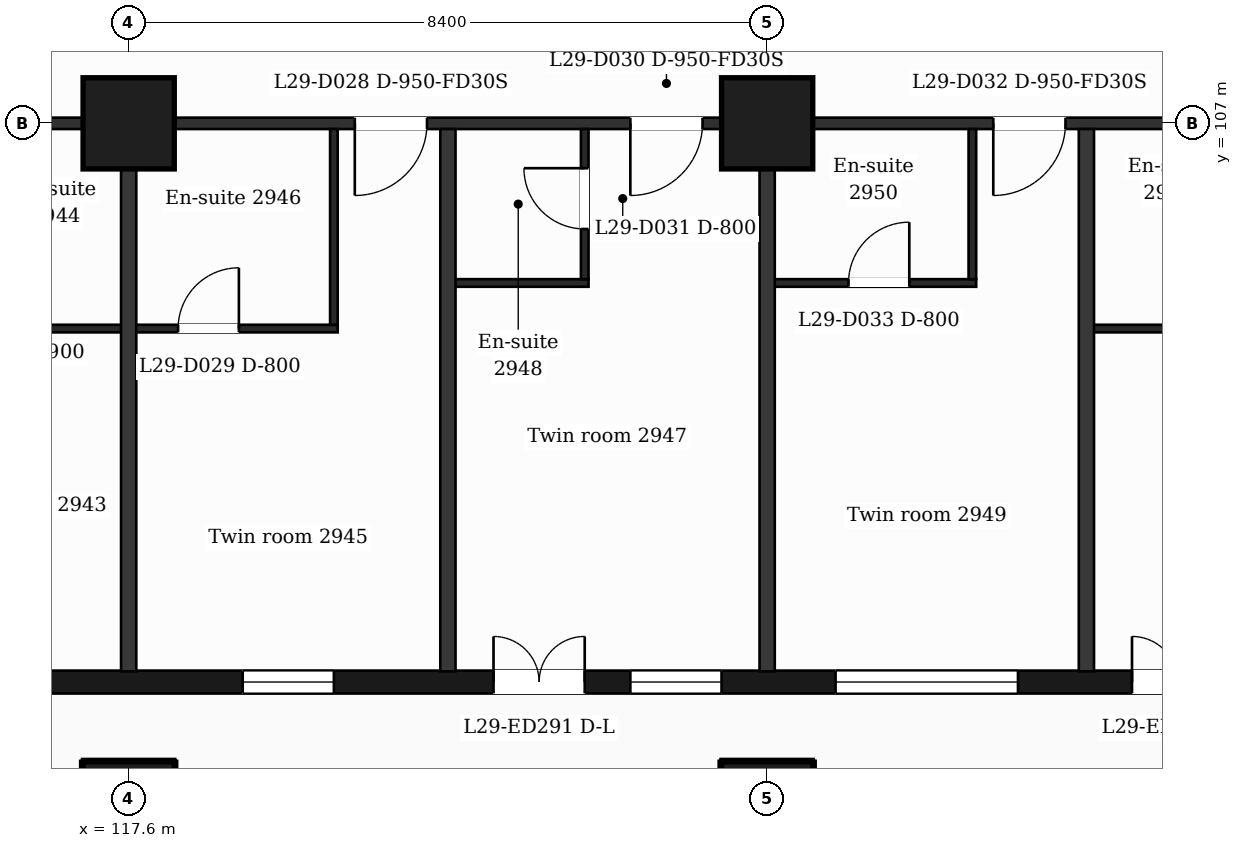
"""IFC4 building model, lengths in metres.
Left out: names, types, materials, properties, quantities, classifications, styles, units other than length and angle.
Written with IfcOpenShell. Run it as: python <this file> out.ifc"""

import sys

from ifc_helpers import new_model, si_unit, direction, frame, frame_2d, origin, origin_2d, place, context, subcontext, project, spatial, rectangle, extrude, element, fill, save


model = new_model("IFC4")
c1 = context("Model", 3, precision=1e-05, world=origin(), true_north=direction((0.0, 1.0)))
c2 = subcontext(c1, "Body", "Model", "MODEL_VIEW")
j1 = project(units=[si_unit("LENGTHUNIT", "METRE"), si_unit("PLANEANGLEUNIT", "RADIAN")], contexts=[c1])
p1 = place(None, origin())
s1 = spatial("IfcSite", under=j1, at=p1, CompositionType="ELEMENT")
p2 = place(p1, origin())
s2 = spatial("IfcBuilding", under=s1, at=p2, CompositionType="ELEMENT")
p3 = place(p2, frame((0.0, 0.0, 124.3)))
s3 = spatial("IfcBuildingStorey", under=s2, at=p3, CompositionType="ELEMENT", Elevation=124.3)
for number, where, z_axis, x_axis in (
    (1, (117.6, 98.0, 0.0), (0.0, 0.0, 1.0), (1.0, 0.0, 0.0)),
    (2, (126.0, 98.0, 0.0), (0.0, 0.0, 1.0), (1.0, 0.0, 0.0)),
    (3, (117.6, 107.0, 0.0), (0.0, 0.0, 1.0), (1.0, 0.0, 0.0)),
    (4, (126.0, 107.0, 0.0), (0.0, 0.0, 1.0), (1.0, 0.0, 0.0)),
):
    element("IfcColumn", number, at=place(p3, frame(where, z_axis=z_axis, x_axis=x_axis)), inside=s3, PredefinedType="COLUMN", context=c2, shape_type="SweptSolid", body=[
        extrude(rectangle(XDim=1.2, YDim=1.2, at=origin_2d()), origin(), (0.0, 0.0, 1.0), 3.7),
    ])
p4 = place(p3, frame((89.85, 99.65, 0.0), z_axis=(0.0, 0.0, 1.0), x_axis=(1.0, 0.0, 0.0)))
e5 = element("IfcWall", 5, at=p4, inside=s3, PredefinedType="SOLIDWALL", context=c2, shape_type="SweptSolid", body=[
    extrude(rectangle(XDim=47.25, YDim=0.3, at=frame_2d((23.625, 0.0))), origin(), (0.0, 0.0, 1.0), 3.38),
])
p5 = place(p4, frame((0.725, 0.0, 0.9)))
e6 = element("IfcOpeningElement", 6, at=p5, cuts=e5, PredefinedType="OPENING", context=c2, shape_type="SweptSolid", body=[
    extrude(rectangle(XDim=1.2, YDim=2.1, at=frame_2d((0.6, 1.05))), frame((0.0, 0.16, 0.0), z_axis=(0.0, -1.0, 0.0), x_axis=(1.0, 0.0, 0.0)), (0.0, 0.0, 1.0), 0.32),
])
p6 = place(p4, frame((3.45, 0.0, 0.9)))
e7 = element("IfcOpeningElement", 7, at=p6, cuts=e5, PredefinedType="OPENING", context=c2, shape_type="SweptSolid", body=[
    extrude(rectangle(XDim=2.4, YDim=2.1, at=frame_2d((1.2, 1.05))), frame((0.0, 0.16, 0.0), z_axis=(0.0, -1.0, 0.0), x_axis=(1.0, 0.0, 0.0)), (0.0, 0.0, 1.0), 0.32),
])
p7 = place(p4, frame((7.65, 0.0, 0.9)))
e8 = element("IfcOpeningElement", 8, at=p7, cuts=e5, PredefinedType="OPENING", context=c2, shape_type="SweptSolid", body=[
    extrude(rectangle(XDim=2.4, YDim=2.1, at=frame_2d((1.2, 1.05))), frame((0.0, 0.16, 0.0), z_axis=(0.0, -1.0, 0.0), x_axis=(1.0, 0.0, 0.0)), (0.0, 0.0, 1.0), 0.32),
])
p8 = place(p4, frame((11.85, 0.0, 0.9)))
e9 = element("IfcOpeningElement", 9, at=p8, cuts=e5, PredefinedType="OPENING", context=c2, shape_type="SweptSolid", body=[
    extrude(rectangle(XDim=2.4, YDim=2.1, at=frame_2d((1.2, 1.05))), frame((0.0, 0.16, 0.0), z_axis=(0.0, -1.0, 0.0), x_axis=(1.0, 0.0, 0.0)), (0.0, 0.0, 1.0), 0.32),
])
p9 = place(p4, frame((16.05, 0.0, 0.9)))
e10 = element("IfcOpeningElement", 10, at=p9, cuts=e5, PredefinedType="OPENING", context=c2, shape_type="SweptSolid", body=[
    extrude(rectangle(XDim=2.4, YDim=2.1, at=frame_2d((1.2, 1.05))), frame((0.0, 0.16, 0.0), z_axis=(0.0, -1.0, 0.0), x_axis=(1.0, 0.0, 0.0)), (0.0, 0.0, 1.0), 0.32),
])
p10 = place(p4, frame((20.25, 0.0, 0.9)))
e11 = element("IfcOpeningElement", 11, at=p10, cuts=e5, PredefinedType="OPENING", context=c2, shape_type="SweptSolid", body=[
    extrude(rectangle(XDim=2.4, YDim=2.1, at=frame_2d((1.2, 1.05))), frame((0.0, 0.16, 0.0), z_axis=(0.0, -1.0, 0.0), x_axis=(1.0, 0.0, 0.0)), (0.0, 0.0, 1.0), 0.32),
])
p11 = place(p4, frame((25.05, 0.0, 0.9)))
e12 = element("IfcOpeningElement", 12, at=p11, cuts=e5, PredefinedType="OPENING", context=c2, shape_type="SweptSolid", body=[
    extrude(rectangle(XDim=1.2, YDim=2.1, at=frame_2d((0.6, 1.05))), frame((0.0, 0.16, 0.0), z_axis=(0.0, -1.0, 0.0), x_axis=(1.0, 0.0, 0.0)), (0.0, 0.0, 1.0), 0.32),
])
p12 = place(p4, frame((29.25, 0.0, 0.9)))
e13 = element("IfcOpeningElement", 13, at=p12, cuts=e5, PredefinedType="OPENING", context=c2, shape_type="SweptSolid", body=[
    extrude(rectangle(XDim=1.2, YDim=2.1, at=frame_2d((0.6, 1.05))), frame((0.0, 0.16, 0.0), z_axis=(0.0, -1.0, 0.0), x_axis=(1.0, 0.0, 0.0)), (0.0, 0.0, 1.0), 0.32),
])
p13 = place(p4, frame((32.55, 0.0, 0.0)))
e14 = element("IfcOpeningElement", 14, at=p13, cuts=e5, PredefinedType="OPENING", context=c2, shape_type="SweptSolid", body=[
    extrude(rectangle(XDim=1.2, YDim=2.4, at=frame_2d((0.6, 1.2))), frame((0.0, 0.16, 0.0), z_axis=(0.0, -1.0, 0.0), x_axis=(1.0, 0.0, 0.0)), (0.0, 0.0, 1.0), 0.32),
])
p14 = place(p4, frame((34.35, 0.0, 0.9)))
e15 = element("IfcOpeningElement", 15, at=p14, cuts=e5, PredefinedType="OPENING", context=c2, shape_type="SweptSolid", body=[
    extrude(rectangle(XDim=1.2, YDim=2.1, at=frame_2d((0.6, 1.05))), frame((0.0, 0.16, 0.0), z_axis=(0.0, -1.0, 0.0), x_axis=(1.0, 0.0, 0.0)), (0.0, 0.0, 1.0), 0.32),
])
p15 = place(p4, frame((37.05, 0.0, 0.9)))
e16 = element("IfcOpeningElement", 16, at=p15, cuts=e5, PredefinedType="OPENING", context=c2, shape_type="SweptSolid", body=[
    extrude(rectangle(XDim=2.4, YDim=2.1, at=frame_2d((1.2, 1.05))), frame((0.0, 0.16, 0.0), z_axis=(0.0, -1.0, 0.0), x_axis=(1.0, 0.0, 0.0)), (0.0, 0.0, 1.0), 0.32),
])
p16 = place(p4, frame((40.95, 0.0, 0.0)))
e17 = element("IfcOpeningElement", 17, at=p16, cuts=e5, PredefinedType="OPENING", context=c2, shape_type="SweptSolid", body=[
    extrude(rectangle(XDim=1.2, YDim=2.4, at=frame_2d((0.6, 1.2))), frame((0.0, 0.16, 0.0), z_axis=(0.0, -1.0, 0.0), x_axis=(1.0, 0.0, 0.0)), (0.0, 0.0, 1.0), 0.32),
])
p17 = place(p4, frame((42.75, 0.0, 0.9)))
e18 = element("IfcOpeningElement", 18, at=p17, cuts=e5, PredefinedType="OPENING", context=c2, shape_type="SweptSolid", body=[
    extrude(rectangle(XDim=1.2, YDim=2.1, at=frame_2d((0.6, 1.05))), frame((0.0, 0.16, 0.0), z_axis=(0.0, -1.0, 0.0), x_axis=(1.0, 0.0, 0.0)), (0.0, 0.0, 1.0), 0.32),
])
p18 = place(p4, frame((45.25, 0.0, 0.9)))
e19 = element("IfcOpeningElement", 19, at=p18, cuts=e5, PredefinedType="OPENING", context=c2, shape_type="SweptSolid", body=[
    extrude(rectangle(XDim=1.2, YDim=2.1, at=frame_2d((0.6, 1.05))), frame((0.0, 0.16, 0.0), z_axis=(0.0, -1.0, 0.0), x_axis=(1.0, 0.0, 0.0)), (0.0, 0.0, 1.0), 0.32),
])
p19 = place(p3, frame((114.85, 104.3, 0.0), z_axis=(0.0, 0.0, 1.0), x_axis=(1.0, 0.0, 0.0)))
e20 = element("IfcWall", 20, at=p19, inside=s3, PredefinedType="PARTITIONING", context=c2, shape_type="SweptSolid", body=[
    extrude(rectangle(XDim=5.5, YDim=0.1, at=frame_2d((2.75, 0.0))), origin(), (0.0, 0.0, 1.0), 3.38),
])
p20 = place(p19, frame((3.4, 0.0, 0.0)))
e21 = element("IfcOpeningElement", 21, at=p20, cuts=e20, PredefinedType="OPENING", context=c2, shape_type="SweptSolid", body=[
    extrude(rectangle(XDim=0.8, YDim=2.1, at=frame_2d((0.4, 1.05))), frame((0.0, 0.06, 0.0), z_axis=(0.0, -1.0, 0.0), x_axis=(1.0, 0.0, 0.0)), (0.0, 0.0, 1.0), 0.12),
])
p21 = place(p3, frame((130.2, 104.3, 0.0), z_axis=(0.0, 0.0, 1.0), x_axis=(1.0, 0.0, 0.0)))
e22 = element("IfcWall", 22, at=p21, inside=s3, PredefinedType="PARTITIONING", context=c2, shape_type="SweptSolid", body=[
    extrude(rectangle(XDim=2.15, YDim=0.1, at=frame_2d((1.075, 0.0))), origin(), (0.0, 0.0, 1.0), 3.38),
])
p22 = place(p3, frame((121.8, 104.9, 0.0), z_axis=(0.0, 0.0, 1.0), x_axis=(1.0, 0.0, 0.0)))
e23 = element("IfcWall", 23, at=p22, inside=s3, PredefinedType="PARTITIONING", context=c2, shape_type="SweptSolid", body=[
    extrude(rectangle(XDim=1.85, YDim=0.1, at=frame_2d((0.925, 0.0))), origin(), (0.0, 0.0, 1.0), 3.38),
])
p23 = place(p3, frame((126.0, 104.9, 0.0), z_axis=(0.0, 0.0, 1.0), x_axis=(1.0, 0.0, 0.0)))
e24 = element("IfcWall", 24, at=p23, inside=s3, PredefinedType="PARTITIONING", context=c2, shape_type="SweptSolid", body=[
    extrude(rectangle(XDim=2.75, YDim=0.1, at=frame_2d((1.375, 0.0))), origin(), (0.0, 0.0, 1.0), 3.38),
])
p24 = place(p23, frame((1.07, 0.0, 0.0)))
e25 = element("IfcOpeningElement", 25, at=p24, cuts=e24, PredefinedType="OPENING", context=c2, shape_type="SweptSolid", body=[
    extrude(rectangle(XDim=0.8, YDim=2.1, at=frame_2d((0.4, 1.05))), frame((0.0, 0.06, 0.0), z_axis=(0.0, -1.0, 0.0), x_axis=(1.0, 0.0, 0.0)), (0.0, 0.0, 1.0), 0.12),
])
p25 = place(p3, frame((87.018, 107.0, 0.0), z_axis=(0.0, 0.0, 1.0), x_axis=(1.0, 0.0, 0.0)))
e26 = element("IfcWall", 26, at=p25, inside=s3, PredefinedType="PARTITIONING", context=c2, shape_type="SweptSolid", body=[
    extrude(rectangle(XDim=52.765, YDim=0.15, at=frame_2d((26.382, 0.0))), origin(), (0.0, 0.0, 1.0), 3.38),
])
p26 = place(p25, frame((1.276, 0.0, 0.0)))
e27 = element("IfcOpeningElement", 27, at=p26, cuts=e26, PredefinedType="OPENING", context=c2, shape_type="SweptSolid", body=[
    extrude(rectangle(XDim=0.95, YDim=2.1, at=frame_2d((0.475, 1.05))), frame((0.0, 0.085, 0.0), z_axis=(0.0, -1.0, 0.0), x_axis=(1.0, 0.0, 0.0)), (0.0, 0.0, 1.0), 0.17),
])
p27 = place(p25, frame((6.192, 0.0, 0.0)))
e28 = element("IfcOpeningElement", 28, at=p27, cuts=e26, PredefinedType="OPENING", context=c2, shape_type="SweptSolid", body=[
    extrude(rectangle(XDim=0.95, YDim=2.1, at=frame_2d((0.475, 1.05))), frame((0.0, 0.085, 0.0), z_axis=(0.0, -1.0, 0.0), x_axis=(1.0, 0.0, 0.0)), (0.0, 0.0, 1.0), 0.17),
])
p28 = place(p25, frame((11.982, 0.0, 0.0)))
e29 = element("IfcOpeningElement", 29, at=p28, cuts=e26, PredefinedType="OPENING", context=c2, shape_type="SweptSolid", body=[
    extrude(rectangle(XDim=1.0, YDim=2.1, at=frame_2d((0.5, 1.05))), frame((0.0, 0.085, 0.0), z_axis=(0.0, -1.0, 0.0), x_axis=(1.0, 0.0, 0.0)), (0.0, 0.0, 1.0), 0.17),
])
p29 = place(p25, frame((14.582, 0.0, 0.0)))
e30 = element("IfcOpeningElement", 30, at=p29, cuts=e26, PredefinedType="OPENING", context=c2, shape_type="SweptSolid", body=[
    extrude(rectangle(XDim=0.95, YDim=2.1, at=frame_2d((0.475, 1.05))), frame((0.0, 0.085, 0.0), z_axis=(0.0, -1.0, 0.0), x_axis=(1.0, 0.0, 0.0)), (0.0, 0.0, 1.0), 0.17),
])
p30 = place(p25, frame((18.257, 0.0, 0.0)))
e31 = element("IfcOpeningElement", 31, at=p30, cuts=e26, PredefinedType="OPENING", context=c2, shape_type="SweptSolid", body=[
    extrude(rectangle(XDim=0.95, YDim=2.1, at=frame_2d((0.475, 1.05))), frame((0.0, 0.085, 0.0), z_axis=(0.0, -1.0, 0.0), x_axis=(1.0, 0.0, 0.0)), (0.0, 0.0, 1.0), 0.17),
])
p31 = place(p25, frame((22.992, 0.0, 0.0)))
e32 = element("IfcOpeningElement", 32, at=p31, cuts=e26, PredefinedType="OPENING", context=c2, shape_type="SweptSolid", body=[
    extrude(rectangle(XDim=0.95, YDim=2.1, at=frame_2d((0.475, 1.05))), frame((0.0, 0.085, 0.0), z_axis=(0.0, -1.0, 0.0), x_axis=(1.0, 0.0, 0.0)), (0.0, 0.0, 1.0), 0.17),
])
p32 = place(p25, frame((26.632, 0.0, 0.0)))
e33 = element("IfcOpeningElement", 33, at=p32, cuts=e26, PredefinedType="OPENING", context=c2, shape_type="SweptSolid", body=[
    extrude(rectangle(XDim=1.0, YDim=2.1, at=frame_2d((0.5, 1.05))), frame((0.0, 0.085, 0.0), z_axis=(0.0, -1.0, 0.0), x_axis=(1.0, 0.0, 0.0)), (0.0, 0.0, 1.0), 0.17),
])
p33 = place(p25, frame((33.557, 0.0, 0.0)))
e34 = element("IfcOpeningElement", 34, at=p33, cuts=e26, PredefinedType="OPENING", context=c2, shape_type="SweptSolid", body=[
    extrude(rectangle(XDim=0.95, YDim=2.1, at=frame_2d((0.475, 1.05))), frame((0.0, 0.085, 0.0), z_axis=(0.0, -1.0, 0.0), x_axis=(1.0, 0.0, 0.0)), (0.0, 0.0, 1.0), 0.17),
])
p34 = place(p25, frame((37.182, 0.0, 0.0)))
e35 = element("IfcOpeningElement", 35, at=p34, cuts=e26, PredefinedType="OPENING", context=c2, shape_type="SweptSolid", body=[
    extrude(rectangle(XDim=0.95, YDim=2.1, at=frame_2d((0.475, 1.05))), frame((0.0, 0.085, 0.0), z_axis=(0.0, -1.0, 0.0), x_axis=(1.0, 0.0, 0.0)), (0.0, 0.0, 1.0), 0.17),
])
p35 = place(p25, frame((41.957, 0.0, 0.0)))
e36 = element("IfcOpeningElement", 36, at=p35, cuts=e26, PredefinedType="OPENING", context=c2, shape_type="SweptSolid", body=[
    extrude(rectangle(XDim=0.95, YDim=2.1, at=frame_2d((0.475, 1.05))), frame((0.0, 0.085, 0.0), z_axis=(0.0, -1.0, 0.0), x_axis=(1.0, 0.0, 0.0)), (0.0, 0.0, 1.0), 0.17),
])
p36 = place(p25, frame((45.622, 0.0, 0.0)))
e37 = element("IfcOpeningElement", 37, at=p36, cuts=e26, PredefinedType="OPENING", context=c2, shape_type="SweptSolid", body=[
    extrude(rectangle(XDim=0.95, YDim=2.1, at=frame_2d((0.475, 1.05))), frame((0.0, 0.085, 0.0), z_axis=(0.0, -1.0, 0.0), x_axis=(1.0, 0.0, 0.0)), (0.0, 0.0, 1.0), 0.17),
])
p37 = place(p25, frame((48.56, 0.0, 0.0)))
e38 = element("IfcOpeningElement", 38, at=p37, cuts=e26, PredefinedType="OPENING", context=c2, shape_type="SweptSolid", body=[
    extrude(rectangle(XDim=0.95, YDim=2.1, at=frame_2d((0.475, 1.05))), frame((0.0, 0.085, 0.0), z_axis=(0.0, -1.0, 0.0), x_axis=(1.0, 0.0, 0.0)), (0.0, 0.0, 1.0), 0.17),
])
p38 = place(p3, frame((117.6, 99.79, 0.0), z_axis=(0.0, 0.0, 1.0), x_axis=(0.0, 1.0, 0.0)))
e39 = element("IfcWall", 39, at=p38, inside=s3, PredefinedType="PARTITIONING", context=c2, shape_type="SweptSolid", body=[
    extrude(rectangle(XDim=7.135, YDim=0.2, at=frame_2d((3.567, 0.0))), origin(), (0.0, 0.0, 1.0), 3.38),
])
p39 = place(p3, frame((120.3, 104.35, 0.0), z_axis=(0.0, 0.0, 1.0), x_axis=(0.0, 1.0, 0.0)))
e40 = element("IfcWall", 40, at=p39, inside=s3, PredefinedType="PARTITIONING", context=c2, shape_type="SweptSolid", body=[
    extrude(rectangle(XDim=2.575, YDim=0.1, at=frame_2d((1.288, 0.0))), origin(), (0.0, 0.0, 1.0), 3.38),
])
p40 = place(p3, frame((121.8, 99.79, 0.0), z_axis=(0.0, 0.0, 1.0), x_axis=(0.0, 1.0, 0.0)))
e41 = element("IfcWall", 41, at=p40, inside=s3, PredefinedType="PARTITIONING", context=c2, shape_type="SweptSolid", body=[
    extrude(rectangle(XDim=7.135, YDim=0.2, at=frame_2d((3.567, 0.0))), origin(), (0.0, 0.0, 1.0), 3.38),
])
p41 = place(p3, frame((123.6, 104.95, 0.0), z_axis=(0.0, 0.0, 1.0), x_axis=(0.0, 1.0, 0.0)))
e42 = element("IfcWall", 42, at=p41, inside=s3, PredefinedType="PARTITIONING", context=c2, shape_type="SweptSolid", body=[
    extrude(rectangle(XDim=1.975, YDim=0.1, at=frame_2d((0.988, 0.0))), origin(), (0.0, 0.0, 1.0), 3.38),
])
p42 = place(p41, frame((0.66, 0.0, 0.0)))
e43 = element("IfcOpeningElement", 43, at=p42, cuts=e42, PredefinedType="OPENING", context=c2, shape_type="SweptSolid", body=[
    extrude(rectangle(XDim=0.8, YDim=2.1, at=frame_2d((0.4, 1.05))), frame((0.0, 0.06, 0.0), z_axis=(0.0, -1.0, 0.0), x_axis=(1.0, 0.0, 0.0)), (0.0, 0.0, 1.0), 0.12),
])
p43 = place(p3, frame((126.0, 99.79, 0.0), z_axis=(0.0, 0.0, 1.0), x_axis=(0.0, 1.0, 0.0)))
e44 = element("IfcWall", 44, at=p43, inside=s3, PredefinedType="PARTITIONING", context=c2, shape_type="SweptSolid", body=[
    extrude(rectangle(XDim=7.135, YDim=0.2, at=frame_2d((3.567, 0.0))), origin(), (0.0, 0.0, 1.0), 3.38),
])
p44 = place(p3, frame((128.7, 104.95, 0.0), z_axis=(0.0, 0.0, 1.0), x_axis=(0.0, 1.0, 0.0)))
e45 = element("IfcWall", 45, at=p44, inside=s3, PredefinedType="PARTITIONING", context=c2, shape_type="SweptSolid", body=[
    extrude(rectangle(XDim=1.975, YDim=0.1, at=frame_2d((0.988, 0.0))), origin(), (0.0, 0.0, 1.0), 3.38),
])
p45 = place(p3, frame((130.2, 99.79, 0.0), z_axis=(0.0, 0.0, 1.0), x_axis=(0.0, 1.0, 0.0)))
e46 = element("IfcWall", 46, at=p45, inside=s3, PredefinedType="PARTITIONING", context=c2, shape_type="SweptSolid", body=[
    extrude(rectangle(XDim=7.135, YDim=0.2, at=frame_2d((3.567, 0.0))), origin(), (0.0, 0.0, 1.0), 3.38),
])
p46 = place(p12, origin())
e47 = element("IfcWindow", 47, at=p46, inside=s3, PartitioningType="SINGLE_PANEL", PredefinedType="WINDOW", context=c2, shape_type="SweptSolid", body=[
    extrude(rectangle(XDim=1.2, YDim=2.1, at=frame_2d((0.6, 1.05))), frame((0.0, 0.03, 0.0), z_axis=(0.0, -1.0, 0.0), x_axis=(1.0, 0.0, 0.0)), (0.0, 0.0, 1.0), 0.06),
])
fill(e13, e47)
p47 = place(p13, origin())
e48 = element("IfcDoor", 48, at=p47, inside=s3, OperationType="DOUBLE_DOOR_SINGLE_SWING", PredefinedType="DOOR", context=c2, shape_type="SweptSolid", body=[
    extrude(rectangle(XDim=1.2, YDim=2.4, at=frame_2d((0.6, 1.2))), frame((0.0, 0.025, 0.0), z_axis=(0.0, -1.0, 0.0), x_axis=(1.0, 0.0, 0.0)), (0.0, 0.0, 1.0), 0.05),
])
fill(e14, e48)
p48 = place(p14, origin())
e49 = element("IfcWindow", 49, at=p48, inside=s3, PartitioningType="SINGLE_PANEL", PredefinedType="WINDOW", context=c2, shape_type="SweptSolid", body=[
    extrude(rectangle(XDim=1.2, YDim=2.1, at=frame_2d((0.6, 1.05))), frame((0.0, 0.03, 0.0), z_axis=(0.0, -1.0, 0.0), x_axis=(1.0, 0.0, 0.0)), (0.0, 0.0, 1.0), 0.06),
])
fill(e15, e49)
p49 = place(p15, origin())
e50 = element("IfcWindow", 50, at=p49, inside=s3, PartitioningType="SINGLE_PANEL", PredefinedType="WINDOW", context=c2, shape_type="SweptSolid", body=[
    extrude(rectangle(XDim=2.4, YDim=2.1, at=frame_2d((1.2, 1.05))), frame((0.0, 0.03, 0.0), z_axis=(0.0, -1.0, 0.0), x_axis=(1.0, 0.0, 0.0)), (0.0, 0.0, 1.0), 0.06),
])
fill(e16, e50)
p50 = place(p16, origin())
e51 = element("IfcDoor", 51, at=p50, inside=s3, OperationType="DOUBLE_DOOR_SINGLE_SWING", PredefinedType="DOOR", context=c2, shape_type="SweptSolid", body=[
    extrude(rectangle(XDim=1.2, YDim=2.4, at=frame_2d((0.6, 1.2))), frame((0.0, 0.025, 0.0), z_axis=(0.0, -1.0, 0.0), x_axis=(1.0, 0.0, 0.0)), (0.0, 0.0, 1.0), 0.05),
])
fill(e17, e51)
p51 = place(p33, origin())
e52 = element("IfcDoor", 52, at=p51, inside=s3, OperationType="SINGLE_SWING_LEFT", PredefinedType="DOOR", context=c2, shape_type="SweptSolid", body=[
    extrude(rectangle(XDim=0.95, YDim=2.1, at=frame_2d((0.475, 1.05))), frame((0.0, 0.025, 0.0), z_axis=(0.0, -1.0, 0.0), x_axis=(1.0, 0.0, 0.0)), (0.0, 0.0, 1.0), 0.05),
])
fill(e34, e52)
p52 = place(p20, origin())
e53 = element("IfcDoor", 53, at=p52, inside=s3, OperationType="SINGLE_SWING_RIGHT", PredefinedType="DOOR", context=c2, shape_type="SweptSolid", body=[
    extrude(rectangle(XDim=0.8, YDim=2.1, at=frame_2d((0.4, 1.05))), frame((0.0, 0.025, 0.0), z_axis=(0.0, -1.0, 0.0), x_axis=(1.0, 0.0, 0.0)), (0.0, 0.0, 1.0), 0.05),
])
fill(e21, e53)
p53 = place(p34, origin())
e54 = element("IfcDoor", 54, at=p53, inside=s3, OperationType="SINGLE_SWING_LEFT", PredefinedType="DOOR", context=c2, shape_type="SweptSolid", body=[
    extrude(rectangle(XDim=0.95, YDim=2.1, at=frame_2d((0.475, 1.05))), frame((0.0, 0.025, 0.0), z_axis=(0.0, -1.0, 0.0), x_axis=(1.0, 0.0, 0.0)), (0.0, 0.0, 1.0), 0.05),
])
fill(e35, e54)
p54 = place(p42, origin())
e55 = element("IfcDoor", 55, at=p54, inside=s3, OperationType="SINGLE_SWING_RIGHT", PredefinedType="DOOR", context=c2, shape_type="SweptSolid", body=[
    extrude(rectangle(XDim=0.8, YDim=2.1, at=frame_2d((0.4, 1.05))), frame((0.0, 0.025, 0.0), z_axis=(0.0, -1.0, 0.0), x_axis=(1.0, 0.0, 0.0)), (0.0, 0.0, 1.0), 0.05),
])
fill(e43, e55)
p55 = place(p35, origin())
e56 = element("IfcDoor", 56, at=p55, inside=s3, OperationType="SINGLE_SWING_LEFT", PredefinedType="DOOR", context=c2, shape_type="SweptSolid", body=[
    extrude(rectangle(XDim=0.95, YDim=2.1, at=frame_2d((0.475, 1.05))), frame((0.0, 0.025, 0.0), z_axis=(0.0, -1.0, 0.0), x_axis=(1.0, 0.0, 0.0)), (0.0, 0.0, 1.0), 0.05),
])
fill(e36, e56)
p56 = place(p24, origin())
e57 = element("IfcDoor", 57, at=p56, inside=s3, OperationType="SINGLE_SWING_RIGHT", PredefinedType="DOOR", context=c2, shape_type="SweptSolid", body=[
    extrude(rectangle(XDim=0.8, YDim=2.1, at=frame_2d((0.4, 1.05))), frame((0.0, 0.025, 0.0), z_axis=(0.0, -1.0, 0.0), x_axis=(1.0, 0.0, 0.0)), (0.0, 0.0, 1.0), 0.05),
])
fill(e25, e57)
save(model, sys.argv[1])
